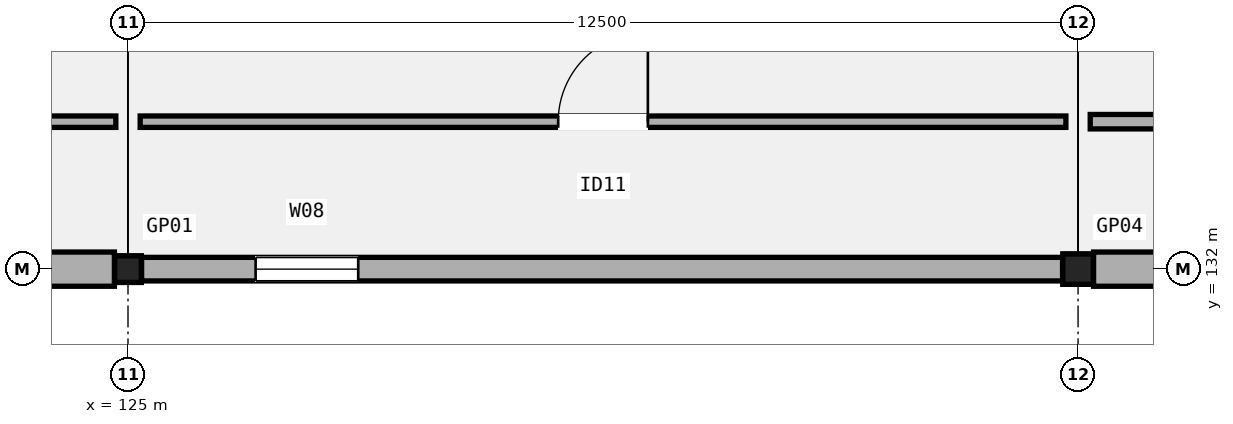
"""IFC4 building model, lengths in metres.
Left out: names, types, materials, properties, quantities, classifications, styles, units other than length and angle.
Written with IfcOpenShell. Run it as: python <this file> out.ifc"""

import sys

from ifc_helpers import new_model, si_unit, direction, frame, frame_2d, origin, origin_2d, place, context, subcontext, project, spatial, rectangle, hollow_rectangle, extrude, element, fill, save


model = new_model("IFC4")
c1 = context("Model", 3, precision=1e-05, world=origin(), true_north=direction((0.0, 1.0)))
c2 = subcontext(c1, "Body", "Model", "MODEL_VIEW")
j1 = project(units=[si_unit("LENGTHUNIT", "METRE"), si_unit("PLANEANGLEUNIT", "RADIAN")], contexts=[c1])
p1 = place(None, origin())
s1 = spatial("IfcSite", under=j1, at=p1, CompositionType="ELEMENT")
p2 = place(p1, origin())
s2 = spatial("IfcBuilding", under=s1, at=p2, CompositionType="ELEMENT")
p3 = place(p2, frame((0.0, 0.0, 20.4)))
s3 = spatial("IfcBuildingStorey", under=s2, at=p3, CompositionType="ELEMENT", Elevation=20.4)
p4 = place(p3, frame((125.0, 132.0, 0.0), z_axis=(0.0, 0.0, 1.0), x_axis=(1.0, 0.0, 0.0)))
e1 = element("IfcColumn", 1, at=p4, inside=s3, PredefinedType="COLUMN", context=c2, shape_type="SweptSolid", body=[
    extrude(hollow_rectangle(XDim=0.35, YDim=0.35, WallThickness=0.016, InnerFilletRadius=0.016, OuterFilletRadius=0.032, at=origin_2d()), origin(), (0.0, 0.0, 1.0), 5.4),
])
p5 = place(p3, frame((137.5, 132.0, 0.0), z_axis=(0.0, 0.0, 1.0), x_axis=(1.0, 0.0, 0.0)))
e2 = element("IfcColumn", 2, at=p5, inside=s3, PredefinedType="COLUMN", context=c2, shape_type="SweptSolid", body=[
    extrude(hollow_rectangle(XDim=0.4, YDim=0.4, WallThickness=0.016, InnerFilletRadius=0.016, OuterFilletRadius=0.032, at=origin_2d()), origin(), (0.0, 0.0, 1.0), 5.4),
])
p6 = place(p3, frame((112.204, 132.0, 0.0), z_axis=(0.0, 0.0, 1.0), x_axis=(1.0, 0.0, 0.0)))
e3 = element("IfcWall", 3, at=p6, inside=s3, PredefinedType="SOLIDWALL", context=c2, shape_type="SweptSolid", body=[
    extrude(rectangle(XDim=12.617, YDim=0.45, at=frame_2d((6.309, 0.0))), origin(), (0.0, 0.0, 1.0), 4.592),
])
p7 = place(p6, frame((1.5, 0.0, 0.95)))
e4 = element("IfcOpeningElement", 4, at=p7, cuts=e3, PredefinedType="OPENING", context=c2, shape_type="SweptSolid", body=[
    extrude(rectangle(XDim=1.05, YDim=2.2, at=frame_2d((0.525, 1.1))), frame((0.0, 0.235, 0.0), z_axis=(0.0, -1.0, 0.0), x_axis=(1.0, 0.0, 0.0)), (0.0, 0.0, 1.0), 0.47),
])
p8 = place(p3, frame((125.179, 132.0, 0.0), z_axis=(0.0, 0.0, 1.0), x_axis=(1.0, 0.0, 0.0)))
e5 = element("IfcWall", 5, at=p8, inside=s3, PredefinedType="SOLIDWALL", context=c2, shape_type="SweptSolid", body=[
    extrude(rectangle(XDim=12.117, YDim=0.31, at=frame_2d((6.059, 0.0))), origin(), (0.0, 0.0, 1.0), 4.48),
])
p9 = place(p8, frame((1.5, 0.0, 0.95)))
e6 = element("IfcOpeningElement", 6, at=p9, cuts=e5, PredefinedType="OPENING", context=c2, shape_type="SweptSolid", body=[
    extrude(rectangle(XDim=1.35, YDim=2.4, at=frame_2d((0.675, 1.2))), frame((0.0, 0.165, 0.0), z_axis=(0.0, -1.0, 0.0), x_axis=(1.0, 0.0, 0.0)), (0.0, 0.0, 1.0), 0.33),
])
p10 = place(p3, frame((137.704, 132.0, 0.0), z_axis=(0.0, 0.0, 1.0), x_axis=(1.0, 0.0, 0.0)))
e7 = element("IfcWall", 7, at=p10, inside=s3, PredefinedType="SOLIDWALL", context=c2, shape_type="SweptSolid", body=[
    extrude(rectangle(XDim=12.117, YDim=0.45, at=frame_2d((6.059, 0.0))), origin(), (0.0, 0.0, 1.0), 4.58),
])
p11 = place(p10, frame((1.5, 0.0, 0.95)))
e8 = element("IfcOpeningElement", 8, at=p11, cuts=e7, PredefinedType="OPENING", context=c2, shape_type="SweptSolid", body=[
    extrude(rectangle(XDim=1.5, YDim=2.25, at=frame_2d((0.75, 1.125))), frame((0.0, 0.235, 0.0), z_axis=(0.0, -1.0, 0.0), x_axis=(1.0, 0.0, 0.0)), (0.0, 0.0, 1.0), 0.47),
])
p12 = place(p3, frame((112.16, 133.94, 0.0), z_axis=(0.0, 0.0, 1.0), x_axis=(1.0, 0.0, 0.0)))
e9 = element("IfcWall", 9, at=p12, inside=s3, PredefinedType="PARTITIONING", context=c2, shape_type="SweptSolid", body=[
    extrude(rectangle(XDim=12.68, YDim=0.15, at=frame_2d((6.34, 0.0))), origin(), (0.0, 0.0, 1.0), 4.52),
])
p13 = place(p12, frame((1.56, 0.0, 0.0)))
e10 = element("IfcOpeningElement", 10, at=p13, cuts=e9, PredefinedType="OPENING", context=c2, shape_type="SweptSolid", body=[
    extrude(rectangle(XDim=1.06, YDim=2.15, at=frame_2d((0.53, 1.075))), frame((0.0, 0.085, 0.0), z_axis=(0.0, -1.0, 0.0), x_axis=(1.0, 0.0, 0.0)), (0.0, 0.0, 1.0), 0.17),
])
p14 = place(p12, frame((7.965, 0.0, 0.0)))
e11 = element("IfcOpeningElement", 11, at=p14, cuts=e9, PredefinedType="OPENING", context=c2, shape_type="SweptSolid", body=[
    extrude(rectangle(XDim=1.09, YDim=2.16, at=frame_2d((0.545, 1.08))), frame((0.0, 0.085, 0.0), z_axis=(0.0, -1.0, 0.0), x_axis=(1.0, 0.0, 0.0)), (0.0, 0.0, 1.0), 0.17),
])
p15 = place(p3, frame((125.16, 133.94, 0.0), z_axis=(0.0, 0.0, 1.0), x_axis=(1.0, 0.0, 0.0)))
e12 = element("IfcWall", 12, at=p15, inside=s3, PredefinedType="PARTITIONING", context=c2, shape_type="SweptSolid", body=[
    extrude(rectangle(XDim=12.18, YDim=0.15, at=frame_2d((6.09, 0.0))), origin(), (0.0, 0.0, 1.0), 4.52),
])
p16 = place(p15, frame((5.5, 0.0, 0.0)))
e13 = element("IfcOpeningElement", 13, at=p16, cuts=e12, PredefinedType="OPENING", context=c2, shape_type="SweptSolid", body=[
    extrude(rectangle(XDim=1.18, YDim=2.2, at=frame_2d((0.59, 1.1))), frame((0.0, 0.085, 0.0), z_axis=(0.0, -1.0, 0.0), x_axis=(1.0, 0.0, 0.0)), (0.0, 0.0, 1.0), 0.17),
])
p17 = place(p3, frame((137.66, 133.94, 0.0), z_axis=(0.0, 0.0, 1.0), x_axis=(1.0, 0.0, 0.0)))
e14 = element("IfcWall", 14, at=p17, inside=s3, PredefinedType="PARTITIONING", context=c2, shape_type="SweptSolid", body=[
    extrude(rectangle(XDim=12.18, YDim=0.19, at=frame_2d((6.09, 0.0))), origin(), (0.0, 0.0, 1.0), 4.52),
])
p18 = place(p17, frame((2.461, 0.0, 0.0)))
e15 = element("IfcOpeningElement", 15, at=p18, cuts=e14, PredefinedType="OPENING", context=c2, shape_type="SweptSolid", body=[
    extrude(rectangle(XDim=1.21, YDim=2.18, at=frame_2d((0.605, 1.09))), frame((0.0, 0.105, 0.0), z_axis=(0.0, -1.0, 0.0), x_axis=(1.0, 0.0, 0.0)), (0.0, 0.0, 1.0), 0.21),
])
p19 = place(p17, frame((8.616, 0.0, 0.0)))
e16 = element("IfcOpeningElement", 16, at=p19, cuts=e14, PredefinedType="OPENING", context=c2, shape_type="SweptSolid", body=[
    extrude(rectangle(XDim=1.24, YDim=2.22, at=frame_2d((0.62, 1.11))), frame((0.0, 0.105, 0.0), z_axis=(0.0, -1.0, 0.0), x_axis=(1.0, 0.0, 0.0)), (0.0, 0.0, 1.0), 0.21),
])
p20 = place(p9, origin())
e17 = element("IfcWindow", 17, at=p20, inside=s3, PartitioningType="SINGLE_PANEL", PredefinedType="WINDOW", context=c2, shape_type="SweptSolid", body=[
    extrude(rectangle(XDim=1.35, YDim=2.4, at=frame_2d((0.675, 1.2))), frame((0.0, 0.03, 0.0), z_axis=(0.0, -1.0, 0.0), x_axis=(1.0, 0.0, 0.0)), (0.0, 0.0, 1.0), 0.06),
])
fill(e6, e17)
p21 = place(p16, origin())
e18 = element("IfcDoor", 18, at=p21, inside=s3, OperationType="SINGLE_SWING_RIGHT", PredefinedType="DOOR", context=c2, shape_type="SweptSolid", body=[
    extrude(rectangle(XDim=1.18, YDim=2.2, at=frame_2d((0.59, 1.1))), frame((0.0, 0.025, 0.0), z_axis=(0.0, -1.0, 0.0), x_axis=(1.0, 0.0, 0.0)), (0.0, 0.0, 1.0), 0.05),
])
fill(e13, e18)
save(model, sys.argv[1])
